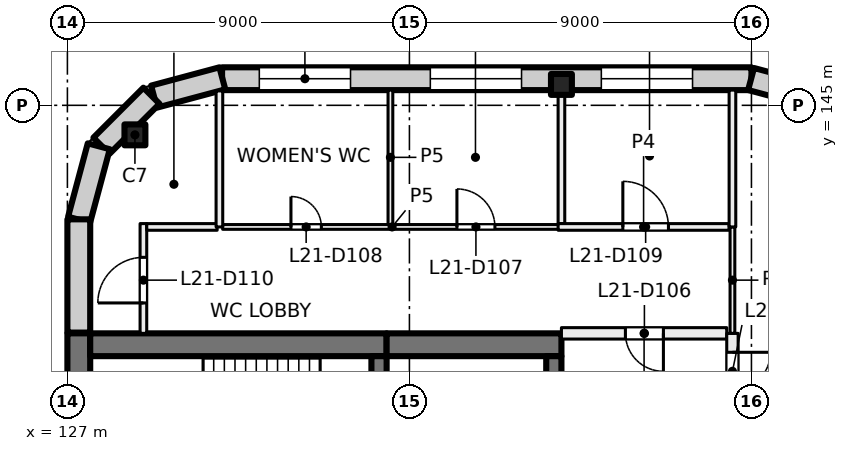
"""IFC4 building model, lengths in metres.
Left out: names, types, materials, properties, quantities, classifications, styles, units other than length and angle.
Written with IfcOpenShell. Run it as: python <this file> out.ifc"""

import sys

from ifc_helpers import new_model, si_unit, direction, frame, frame_2d, origin, origin_2d, place, context, subcontext, project, spatial, rectangle, extrude, element, fill, save


model = new_model("IFC4")
c1 = context("Model", 3, precision=1e-05, world=origin(), true_north=direction((0.0, 1.0)))
c2 = subcontext(c1, "Body", "Model", "MODEL_VIEW")
j1 = project(units=[si_unit("LENGTHUNIT", "METRE"), si_unit("PLANEANGLEUNIT", "RADIAN")], contexts=[c1])
p1 = place(None, origin())
s1 = spatial("IfcSite", under=j1, at=p1, CompositionType="ELEMENT")
p2 = place(p1, origin())
s2 = spatial("IfcBuilding", under=s1, at=p2, CompositionType="ELEMENT")
p3 = place(p2, frame((0.0, 0.0, 93.0)))
s3 = spatial("IfcBuildingStorey", under=s2, at=p3, CompositionType="ELEMENT", Elevation=93.0)
for number, where, z_axis, x_axis in (
    (1, (128.777, 144.223, 0.0), (0.0, 0.0, 1.0), (1.0, 0.0, 0.0)),
    (2, (140.0, 145.55, 0.0), (0.0, 0.0, 1.0), (1.0, 0.0, 0.0)),
):
    element("IfcColumn", number, at=place(p3, frame(where, z_axis=z_axis, x_axis=x_axis)), inside=s3, PredefinedType="COLUMN", context=c2, shape_type="SweptSolid", body=[
        extrude(rectangle(XDim=0.55, YDim=0.55, at=origin_2d()), origin(), (0.0, 0.0, 1.0), 4.0),
    ])
p4 = place(p3, frame((127.3, 135.2, 0.0), z_axis=(0.0, 0.0, 1.0), x_axis=(0.0, 1.0, 0.0)))
e3 = element("IfcWall", 3, at=p4, inside=s3, PredefinedType="SHEAR", context=c2, shape_type="SweptSolid", body=[
    extrude(rectangle(XDim=3.8, YDim=0.6, at=frame_2d((1.9, 0.0))), origin(), (0.0, 0.0, 1.0), 4.0),
])
p5 = place(p3, frame((127.6, 138.7, 0.0), z_axis=(0.0, 0.0, 1.0), x_axis=(1.0, 0.0, 0.0)))
e4 = element("IfcWall", 4, at=p5, inside=s3, PredefinedType="SHEAR", context=c2, shape_type="SweptSolid", body=[
    extrude(rectangle(XDim=7.8, YDim=0.6, at=frame_2d((3.9, 0.0))), origin(), (0.0, 0.0, 1.0), 4.0),
])
p6 = place(p3, frame((135.4, 138.7, 0.0), z_axis=(0.0, 0.0, 1.0), x_axis=(1.0, 0.0, 0.0)))
e5 = element("IfcWall", 5, at=p6, inside=s3, PredefinedType="SHEAR", context=c2, shape_type="SweptSolid", body=[
    extrude(rectangle(XDim=4.6, YDim=0.6, at=frame_2d((2.3, 0.0))), origin(), (0.0, 0.0, 1.0), 4.0),
])
p7 = place(p3, frame((135.2, 135.6, 0.0), z_axis=(0.0, 0.0, 1.0), x_axis=(0.0, 1.0, 0.0)))
e6 = element("IfcWall", 6, at=p7, inside=s3, PredefinedType="SHEAR", context=c2, shape_type="SweptSolid", body=[
    extrude(rectangle(XDim=2.8, YDim=0.4, at=frame_2d((1.4, 0.0))), origin(), (0.0, 0.0, 1.0), 4.0),
])
p8 = place(p7, frame((0.9, 0.0, 0.0)))
e7 = element("IfcOpeningElement", 7, at=p8, cuts=e6, PredefinedType="OPENING", context=c2, shape_type="SweptSolid", body=[
    extrude(rectangle(XDim=1.0, YDim=2.1, at=frame_2d((0.5, 1.05))), frame((0.0, 0.21, 0.0), z_axis=(0.0, -1.0, 0.0), x_axis=(1.0, 0.0, 0.0)), (0.0, 0.0, 1.0), 0.42),
])
p9 = place(p3, frame((139.8, 129.8, 0.0), z_axis=(0.0, 0.0, 1.0), x_axis=(0.0, 1.0, 0.0)))
e8 = element("IfcWall", 8, at=p9, inside=s3, PredefinedType="SHEAR", context=c2, shape_type="SweptSolid", body=[
    extrude(rectangle(XDim=8.6, YDim=0.4, at=frame_2d((4.3, 0.0))), origin(), (0.0, 0.0, 1.0), 4.0),
])
p10 = place(p3, frame((131.07, 145.7, 0.0), z_axis=(0.0, 0.0, 1.0), x_axis=(1.0, 0.0, 0.0)))
e9 = element("IfcWall", 9, at=p10, inside=s3, PredefinedType="SOLIDWALL", context=c2, shape_type="SweptSolid", body=[
    extrude(rectangle(XDim=13.93, YDim=0.6, at=frame_2d((6.965, 0.0))), origin(), (0.0, 0.0, 1.0), 3.625),
])
p11 = place(p10, frame((0.98, 0.0, 0.9)))
e10 = element("IfcOpeningElement", 10, at=p11, cuts=e9, PredefinedType="OPENING", context=c2, shape_type="SweptSolid", body=[
    extrude(rectangle(XDim=2.4, YDim=2.4, at=frame_2d((1.2, 1.2))), frame((0.0, 0.31, 0.0), z_axis=(0.0, -1.0, 0.0), x_axis=(1.0, 0.0, 0.0)), (0.0, 0.0, 1.0), 0.62),
])
p12 = place(p10, frame((5.48, 0.0, 0.9)))
e11 = element("IfcOpeningElement", 11, at=p12, cuts=e9, PredefinedType="OPENING", context=c2, shape_type="SweptSolid", body=[
    extrude(rectangle(XDim=2.4, YDim=2.4, at=frame_2d((1.2, 1.2))), frame((0.0, 0.31, 0.0), z_axis=(0.0, -1.0, 0.0), x_axis=(1.0, 0.0, 0.0)), (0.0, 0.0, 1.0), 0.62),
])
p13 = place(p10, frame((9.98, 0.0, 0.9)))
e12 = element("IfcOpeningElement", 12, at=p13, cuts=e9, PredefinedType="OPENING", context=c2, shape_type="SweptSolid", body=[
    extrude(rectangle(XDim=2.4, YDim=2.4, at=frame_2d((1.2, 1.2))), frame((0.0, 0.31, 0.0), z_axis=(0.0, -1.0, 0.0), x_axis=(1.0, 0.0, 0.0)), (0.0, 0.0, 1.0), 0.62),
])
for number, where, z_axis, x_axis in (
    (13, (129.281, 145.229, 0.0), (0.0, 0.0, 1.0), (0.966, 0.259, 0.0)),
    (14, (127.896, 143.936, 0.0), (0.0, 0.0, 1.0), (0.707, 0.707, 0.0)),
):
    element("IfcWall", number, at=place(p3, frame(where, z_axis=z_axis, x_axis=x_axis)), inside=s3, PredefinedType="SOLIDWALL", context=c2, shape_type="SweptSolid", body=[
        extrude(rectangle(XDim=1.861, YDim=0.6, at=frame_2d((0.93, 0.0))), origin(), (0.0, 0.0, 1.0), 3.625),
    ])
p14 = place(p3, frame((127.308, 141.99, 0.0), z_axis=(0.0, 0.0, 1.0), x_axis=(0.258839784042, 0.965920269068, 0.0)))
e15 = element("IfcWall", 15, at=p14, inside=s3, PredefinedType="SOLIDWALL", context=c2, shape_type="SweptSolid", body=[
    extrude(rectangle(XDim=2.0, YDim=0.6, at=frame_2d((1.0, 0.0))), origin(), (0.0, 0.0, 1.0), 3.625),
])
p15 = place(p3, frame((127.3, 139.02, 0.0), z_axis=(0.0, 0.0, 1.0), x_axis=(0.0, 1.0, 0.0)))
e16 = element("IfcWall", 16, at=p15, inside=s3, PredefinedType="SOLIDWALL", context=c2, shape_type="SweptSolid", body=[
    extrude(rectangle(XDim=2.98, YDim=0.6, at=frame_2d((1.49, 0.0))), origin(), (0.0, 0.0, 1.0), 3.625),
])
p16 = place(p3, frame((144.99, 145.692, 0.0), z_axis=(0.0, 0.0, 1.0), x_axis=(0.965920269068, -0.258839784042, 0.0)))
e17 = element("IfcWall", 17, at=p16, inside=s3, PredefinedType="SOLIDWALL", context=c2, shape_type="SweptSolid", body=[
    extrude(rectangle(XDim=2.0, YDim=0.6, at=frame_2d((1.0, 0.0))), origin(), (0.0, 0.0, 1.0), 3.625),
])
p17 = place(p3, frame((129.0, 139.0, 0.0), z_axis=(0.0, 0.0, 1.0), x_axis=(0.0, 1.0, 0.0)))
e18 = element("IfcWall", 18, at=p17, inside=s3, PredefinedType="PARTITIONING", context=c2, shape_type="SweptSolid", body=[
    extrude(rectangle(XDim=2.888, YDim=0.175, at=frame_2d((1.444, 0.0))), origin(), (0.0, 0.0, 1.0), 3.625),
])
p18 = place(p17, frame((0.8, 0.0, 0.0)))
e19 = element("IfcOpeningElement", 19, at=p18, cuts=e18, PredefinedType="OPENING", context=c2, shape_type="SweptSolid", body=[
    extrude(rectangle(XDim=1.2, YDim=2.1, at=frame_2d((0.6, 1.05))), frame((0.0, 0.097, 0.0), z_axis=(0.0, -1.0, 0.0), x_axis=(1.0, 0.0, 0.0)), (0.0, 0.0, 1.0), 0.195),
])
p19 = place(p3, frame((129.088, 141.8, 0.0), z_axis=(0.0, 0.0, 1.0), x_axis=(1.0, 0.0, 0.0)))
e20 = element("IfcWall", 20, at=p19, inside=s3, PredefinedType="PARTITIONING", context=c2, shape_type="SweptSolid", body=[
    extrude(rectangle(XDim=1.853, YDim=0.175, at=frame_2d((0.927, 0.0))), origin(), (0.0, 0.0, 1.0), 3.625),
])
p20 = place(p3, frame((131.085, 141.8, 0.0), z_axis=(0.0, 0.0, 1.0), x_axis=(1.0, 0.0, 0.0)))
e21 = element("IfcWall", 21, at=p20, inside=s3, PredefinedType="PARTITIONING", context=c2, shape_type="SweptSolid", body=[
    extrude(rectangle(XDim=8.918, YDim=0.125, at=frame_2d((4.459, 0.0))), origin(), (0.0, 0.0, 1.0), 3.625),
])
p21 = place(p20, frame((6.165, 0.0, 0.0)))
e22 = element("IfcOpeningElement", 22, at=p21, cuts=e21, PredefinedType="OPENING", context=c2, shape_type="SweptSolid", body=[
    extrude(rectangle(XDim=1.0, YDim=2.1, at=frame_2d((0.5, 1.05))), frame((0.0, 0.073, 0.0), z_axis=(0.0, -1.0, 0.0), x_axis=(1.0, 0.0, 0.0)), (0.0, 0.0, 1.0), 0.145),
])
p22 = place(p20, frame((1.798, 0.0, 0.0)))
e23 = element("IfcOpeningElement", 23, at=p22, cuts=e21, PredefinedType="OPENING", context=c2, shape_type="SweptSolid", body=[
    extrude(rectangle(XDim=0.8, YDim=2.1, at=frame_2d((0.4, 1.05))), frame((0.0, 0.073, 0.0), z_axis=(0.0, -1.0, 0.0), x_axis=(1.0, 0.0, 0.0)), (0.0, 0.0, 1.0), 0.145),
])
p23 = place(p3, frame((131.0, 145.379, 0.0), z_axis=(0.0, 0.0, 1.0), x_axis=(0.0, -1.0, 0.0)))
e24 = element("IfcWall", 24, at=p23, inside=s3, PredefinedType="PARTITIONING", context=c2, shape_type="SweptSolid", body=[
    extrude(rectangle(XDim=3.579, YDim=0.175, at=frame_2d((1.79, 0.0))), origin(), (0.0, 0.0, 1.0), 3.625),
])
p24 = place(p3, frame((135.5, 141.862, 0.0), z_axis=(0.0, 0.0, 1.0), x_axis=(0.0, 1.0, 0.0)))
e25 = element("IfcWall", 25, at=p24, inside=s3, PredefinedType="PARTITIONING", context=c2, shape_type="SweptSolid", body=[
    extrude(rectangle(XDim=3.538, YDim=0.125, at=frame_2d((1.769, 0.0))), origin(), (0.0, 0.0, 1.0), 3.625),
])
p25 = place(p3, frame((144.35, 139.0, 0.0), z_axis=(0.0, 0.0, 1.0), x_axis=(-1.0, 0.0, 0.0)))
e26 = element("IfcWall", 26, at=p25, inside=s3, PredefinedType="PARTITIONING", context=c2, shape_type="SweptSolid", body=[
    extrude(rectangle(XDim=4.35, YDim=0.3, at=frame_2d((2.175, 0.0))), origin(), (0.0, 0.0, 1.0), 3.625),
])
p26 = place(p25, frame((1.667, 0.0, 0.0)))
e27 = element("IfcOpeningElement", 27, at=p26, cuts=e26, PredefinedType="OPENING", context=c2, shape_type="SweptSolid", body=[
    extrude(rectangle(XDim=1.0, YDim=2.1, at=frame_2d((0.5, 1.05))), frame((0.0, 0.16, 0.0), z_axis=(0.0, -1.0, 0.0), x_axis=(1.0, 0.0, 0.0)), (0.0, 0.0, 1.0), 0.32),
])
p27 = place(p3, frame((140.0, 141.888, 0.0), z_axis=(0.0, 0.0, 1.0), x_axis=(0.0, 1.0, 0.0)))
e28 = element("IfcWall", 28, at=p27, inside=s3, PredefinedType="PARTITIONING", context=c2, shape_type="SweptSolid", body=[
    extrude(rectangle(XDim=3.512, YDim=0.175, at=frame_2d((1.756, 0.0))), origin(), (0.0, 0.0, 1.0), 3.625),
])
p28 = place(p3, frame((139.912, 141.8, 0.0), z_axis=(0.0, 0.0, 1.0), x_axis=(1.0, 0.0, 0.0)))
e29 = element("IfcWall", 29, at=p28, inside=s3, PredefinedType="PARTITIONING", context=c2, shape_type="SweptSolid", body=[
    extrude(rectangle(XDim=4.5, YDim=0.175, at=frame_2d((2.25, 0.0))), origin(), (0.0, 0.0, 1.0), 3.625),
])
p29 = place(p28, frame((1.704, 0.0, 0.0)))
e30 = element("IfcOpeningElement", 30, at=p29, cuts=e29, PredefinedType="OPENING", context=c2, shape_type="SweptSolid", body=[
    extrude(rectangle(XDim=1.2, YDim=2.1, at=frame_2d((0.6, 1.05))), frame((0.0, 0.097, 0.0), z_axis=(0.0, -1.0, 0.0), x_axis=(1.0, 0.0, 0.0)), (0.0, 0.0, 1.0), 0.195),
])
p30 = place(p3, frame((144.5, 139.0, 0.0), z_axis=(0.0, 0.0, 1.0), x_axis=(0.0, -1.0, 0.0)))
e31 = element("IfcWall", 31, at=p30, inside=s3, PredefinedType="PARTITIONING", context=c2, shape_type="SweptSolid", body=[
    extrude(rectangle(XDim=22.0, YDim=0.3, at=frame_2d((11.0, 0.0))), origin(), (0.0, 0.0, 1.0), 3.625),
])
p31 = place(p30, frame((20.501, 0.0, 0.0)))
e32 = element("IfcOpeningElement", 32, at=p31, cuts=e31, PredefinedType="OPENING", context=c2, shape_type="SweptSolid", body=[
    extrude(rectangle(XDim=1.0, YDim=2.1, at=frame_2d((0.5, 1.05))), frame((0.0, 0.16, 0.0), z_axis=(0.0, -1.0, 0.0), x_axis=(1.0, 0.0, 0.0)), (0.0, 0.0, 1.0), 0.32),
])
p32 = place(p30, frame((15.0, 0.0, 0.0)))
e33 = element("IfcOpeningElement", 33, at=p32, cuts=e31, PredefinedType="OPENING", context=c2, shape_type="SweptSolid", body=[
    extrude(rectangle(XDim=1.0, YDim=2.1, at=frame_2d((0.5, 1.05))), frame((0.0, 0.16, 0.0), z_axis=(0.0, -1.0, 0.0), x_axis=(1.0, 0.0, 0.0)), (0.0, 0.0, 1.0), 0.32),
])
p33 = place(p30, frame((6.0, 0.0, 0.0)))
e34 = element("IfcOpeningElement", 34, at=p33, cuts=e31, PredefinedType="OPENING", context=c2, shape_type="SweptSolid", body=[
    extrude(rectangle(XDim=1.0, YDim=2.1, at=frame_2d((0.5, 1.05))), frame((0.0, 0.16, 0.0), z_axis=(0.0, -1.0, 0.0), x_axis=(1.0, 0.0, 0.0)), (0.0, 0.0, 1.0), 0.32),
])
p34 = place(p30, frame((0.499, 0.0, 0.0)))
e35 = element("IfcOpeningElement", 35, at=p34, cuts=e31, PredefinedType="OPENING", context=c2, shape_type="SweptSolid", body=[
    extrude(rectangle(XDim=1.0, YDim=2.1, at=frame_2d((0.5, 1.05))), frame((0.0, 0.16, 0.0), z_axis=(0.0, -1.0, 0.0), x_axis=(1.0, 0.0, 0.0)), (0.0, 0.0, 1.0), 0.32),
])
p35 = place(p3, frame((144.5, 141.8, 0.0), z_axis=(0.0, 0.0, 1.0), x_axis=(0.0, -1.0, 0.0)))
e36 = element("IfcWall", 36, at=p35, inside=s3, PredefinedType="PARTITIONING", context=c2, shape_type="SweptSolid", body=[
    extrude(rectangle(XDim=2.8, YDim=0.125, at=frame_2d((1.4, 0.0))), origin(), (0.0, 0.0, 1.0), 3.625),
])
p36 = place(p3, frame((144.5, 141.8, 0.0), z_axis=(0.0, 0.0, 1.0), x_axis=(0.0, 1.0, 0.0)))
e37 = element("IfcWall", 37, at=p36, inside=s3, PredefinedType="PARTITIONING", context=c2, shape_type="SweptSolid", body=[
    extrude(rectangle(XDim=3.6, YDim=0.175, at=frame_2d((1.8, 0.0))), origin(), (0.0, 0.0, 1.0), 3.625),
])
p37 = place(p11, origin())
e38 = element("IfcWindow", 38, at=p37, inside=s3, PartitioningType="SINGLE_PANEL", PredefinedType="WINDOW", context=c2, shape_type="SweptSolid", body=[
    extrude(rectangle(XDim=2.4, YDim=2.4, at=frame_2d((1.2, 1.2))), frame((0.0, 0.03, 0.0), z_axis=(0.0, -1.0, 0.0), x_axis=(1.0, 0.0, 0.0)), (0.0, 0.0, 1.0), 0.06),
])
fill(e10, e38)
p38 = place(p12, origin())
e39 = element("IfcWindow", 39, at=p38, inside=s3, PartitioningType="SINGLE_PANEL", PredefinedType="WINDOW", context=c2, shape_type="SweptSolid", body=[
    extrude(rectangle(XDim=2.4, YDim=2.4, at=frame_2d((1.2, 1.2))), frame((0.0, 0.03, 0.0), z_axis=(0.0, -1.0, 0.0), x_axis=(1.0, 0.0, 0.0)), (0.0, 0.0, 1.0), 0.06),
])
fill(e11, e39)
p39 = place(p13, origin())
e40 = element("IfcWindow", 40, at=p39, inside=s3, PartitioningType="SINGLE_PANEL", PredefinedType="WINDOW", context=c2, shape_type="SweptSolid", body=[
    extrude(rectangle(XDim=2.4, YDim=2.4, at=frame_2d((1.2, 1.2))), frame((0.0, 0.03, 0.0), z_axis=(0.0, -1.0, 0.0), x_axis=(1.0, 0.0, 0.0)), (0.0, 0.0, 1.0), 0.06),
])
fill(e12, e40)
p40 = place(p34, origin())
e41 = element("IfcDoor", 41, at=p40, inside=s3, OperationType="SINGLE_SWING_LEFT", PredefinedType="DOOR", context=c2, shape_type="SweptSolid", body=[
    extrude(rectangle(XDim=1.0, YDim=2.1, at=frame_2d((0.5, 1.05))), frame((0.0, 0.025, 0.0), z_axis=(0.0, -1.0, 0.0), x_axis=(1.0, 0.0, 0.0)), (0.0, 0.0, 1.0), 0.05),
])
fill(e35, e41)
p41 = place(p26, origin())
e42 = element("IfcDoor", 42, at=p41, inside=s3, OperationType="SINGLE_SWING_LEFT", PredefinedType="DOOR", context=c2, shape_type="SweptSolid", body=[
    extrude(rectangle(XDim=1.0, YDim=2.1, at=frame_2d((0.5, 1.05))), frame((0.0, 0.025, 0.0), z_axis=(0.0, -1.0, 0.0), x_axis=(1.0, 0.0, 0.0)), (0.0, 0.0, 1.0), 0.05),
])
fill(e27, e42)
p42 = place(p21, origin())
e43 = element("IfcDoor", 43, at=p42, inside=s3, OperationType="SINGLE_SWING_RIGHT", PredefinedType="DOOR", context=c2, shape_type="SweptSolid", body=[
    extrude(rectangle(XDim=1.0, YDim=2.1, at=frame_2d((0.5, 1.05))), frame((0.0, 0.025, 0.0), z_axis=(0.0, -1.0, 0.0), x_axis=(1.0, 0.0, 0.0)), (0.0, 0.0, 1.0), 0.05),
])
fill(e22, e43)
p43 = place(p22, origin())
e44 = element("IfcDoor", 44, at=p43, inside=s3, OperationType="SINGLE_SWING_LEFT", PredefinedType="DOOR", context=c2, shape_type="SweptSolid", body=[
    extrude(rectangle(XDim=0.8, YDim=2.1, at=frame_2d((0.4, 1.05))), frame((0.0, 0.025, 0.0), z_axis=(0.0, -1.0, 0.0), x_axis=(1.0, 0.0, 0.0)), (0.0, 0.0, 1.0), 0.05),
])
fill(e23, e44)
p44 = place(p29, origin())
e45 = element("IfcDoor", 45, at=p44, inside=s3, OperationType="DOUBLE_DOOR_SINGLE_SWING", PredefinedType="DOOR", context=c2, shape_type="SweptSolid", body=[
    extrude(rectangle(XDim=1.2, YDim=2.1, at=frame_2d((0.6, 1.05))), frame((0.0, 0.025, 0.0), z_axis=(0.0, -1.0, 0.0), x_axis=(1.0, 0.0, 0.0)), (0.0, 0.0, 1.0), 0.05),
])
fill(e30, e45)
p45 = place(p18, origin())
e46 = element("IfcDoor", 46, at=p45, inside=s3, OperationType="DOUBLE_DOOR_SINGLE_SWING", PredefinedType="DOOR", context=c2, shape_type="SweptSolid", body=[
    extrude(rectangle(XDim=1.2, YDim=2.1, at=frame_2d((0.6, 1.05))), frame((0.0, 0.025, 0.0), z_axis=(0.0, -1.0, 0.0), x_axis=(1.0, 0.0, 0.0)), (0.0, 0.0, 1.0), 0.05),
])
fill(e19, e46)
save(model, sys.argv[1])
